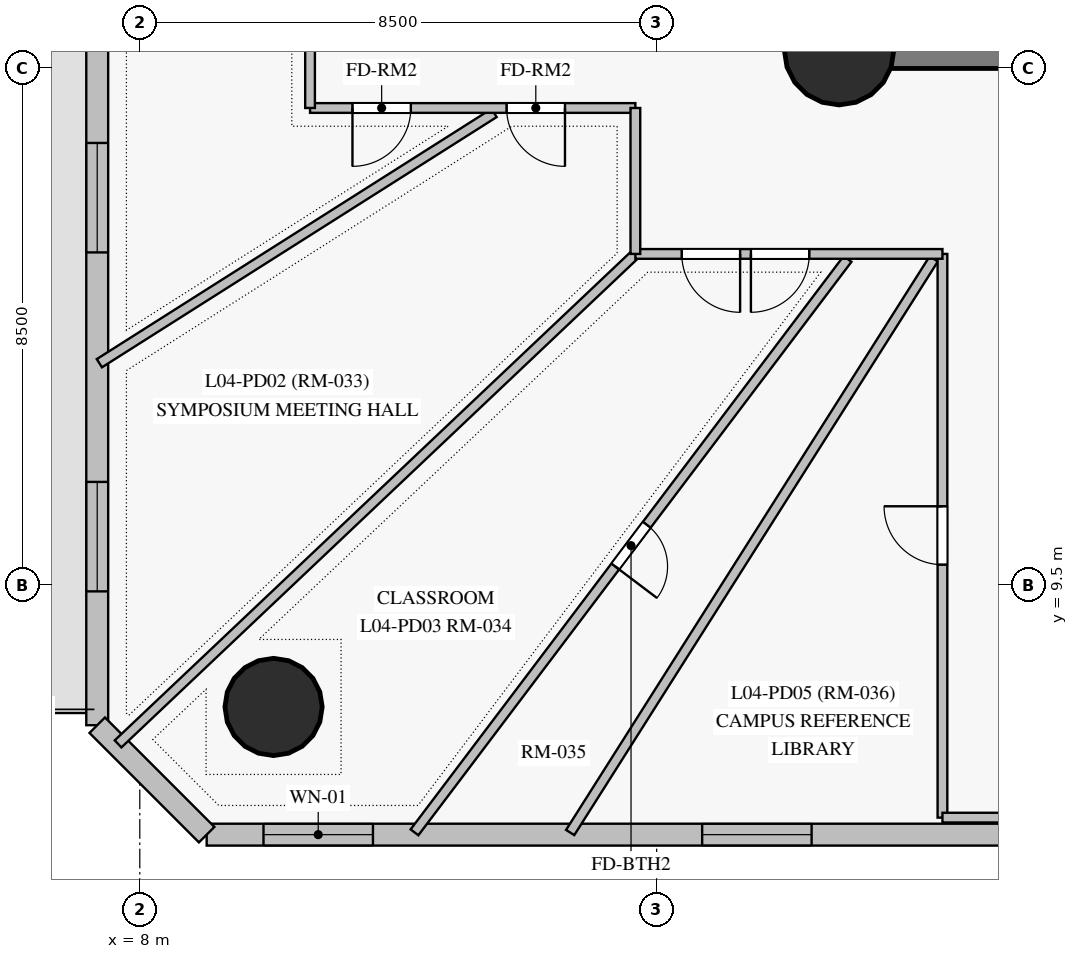
"""IFC4 building model, lengths in metres.
Left out: names, types, materials, properties, quantities, classifications, styles, units other than length and angle.
Written with IfcOpenShell. Run it as: python <this file> out.ifc"""

import sys

from ifc_helpers import new_model, si_unit, direction, frame, frame_2d, origin, origin_with_axes, origin_2d, place, context, subcontext, project, spatial, rectangle, circle, extrude, source, transform, mapped, element, fill, save


model = new_model("IFC4")
c1 = context("Model", 3, precision=1e-05, world=origin(), true_north=direction((0.0, 1.0)))
c2 = subcontext(c1, "Body", "Model", "MODEL_VIEW")
j1 = project(units=[si_unit("LENGTHUNIT", "METRE"), si_unit("PLANEANGLEUNIT", "RADIAN")], contexts=[c1])
p1 = place(None, origin())
s1 = spatial("IfcSite", under=j1, at=p1, CompositionType="ELEMENT")
p2 = place(p1, origin())
s2 = spatial("IfcBuilding", under=s1, at=p2, CompositionType="ELEMENT")
p3 = place(p2, frame((0.0, 0.0, 18.0)))
s3 = spatial("IfcBuildingStorey", under=s2, at=p3, CompositionType="ELEMENT", Elevation=18.0)
p4 = place(p3, frame((19.5, 18.3, 0.0), z_axis=(0.0, 0.0, 1.0), x_axis=(1.0, 0.0, 0.0)))
e1 = element("IfcWall", 1, at=p4, inside=s3, PredefinedType="SHEAR", context=c2, shape_type="SweptSolid", body=[
    extrude(rectangle(XDim=7.05, YDim=0.6, at=frame_2d((3.525, 0.0))), origin(), (0.0, 0.0, 1.0), 4.225),
])
p5 = place(p4, frame((4.2, 0.0, 0.0)))
e2 = element("IfcOpeningElement", 2, at=p5, cuts=e1, PredefinedType="OPENING", context=c2, shape_type="SweptSolid", body=[
    extrude(rectangle(XDim=1.4, YDim=2.2, at=frame_2d((0.7, 1.1))), frame((0.0, 0.31, 0.0), z_axis=(0.0, -1.0, 0.0), x_axis=(1.0, 0.0, 0.0)), (0.0, 0.0, 1.0), 0.62),
])
m1 = source(origin_with_axes(), c2, "Body", "SweptSolid", [
    extrude(circle(Radius=0.9, at=origin_2d()), origin(), (0.0, 0.0, 1.0), 4.5),
])
p6 = place(p3, frame((19.5, 18.3, 0.0), z_axis=(0.0, 0.0, 1.0), x_axis=(1.0, 0.0, 0.0)))
e3 = element("IfcColumn", 3, at=p6, inside=s3, PredefinedType="COLUMN", context=c2, shape_type="MappedRepresentation", body=[
    mapped(m1, transform((0.0, 0.0, 0.0), scale=1.0)),
])
m2 = source(origin_with_axes(), c2, "Body", "SweptSolid", [
    extrude(circle(Radius=0.8, at=origin_2d()), origin(), (0.0, 0.0, 1.0), 4.5),
])
p7 = place(p3, frame((10.2, 7.5, 0.0), z_axis=(0.0, 0.0, 1.0), x_axis=(1.0, 0.0, 0.0)))
e4 = element("IfcColumn", 4, at=p7, inside=s3, PredefinedType="COLUMN", context=c2, shape_type="MappedRepresentation", body=[
    mapped(m2, transform((0.0, 0.0, 0.0), scale=1.0)),
])
p8 = place(p3, frame((9.1, 5.4, 0.0), z_axis=(0.0, 0.0, 1.0), x_axis=(1.0, 0.0, 0.0)))
e5 = element("IfcWall", 5, at=p8, inside=s3, PredefinedType="SOLIDWALL", context=c2, shape_type="SweptSolid", body=[
    extrude(rectangle(XDim=44.3, YDim=0.36, at=frame_2d((22.15, 0.0))), origin(), (0.0, 0.0, 1.0), 4.225),
])
p9 = place(p8, frame((0.934, 0.0, 0.85)))
e6 = element("IfcOpeningElement", 6, at=p9, cuts=e5, PredefinedType="OPENING", context=c2, shape_type="SweptSolid", body=[
    extrude(rectangle(XDim=1.8, YDim=2.2, at=frame_2d((0.9, 1.1))), frame((0.0, 0.19, 0.0), z_axis=(0.0, -1.0, 0.0), x_axis=(1.0, 0.0, 0.0)), (0.0, 0.0, 1.0), 0.38),
])
p10 = place(p8, frame((8.148, 0.0, 0.85)))
e7 = element("IfcOpeningElement", 7, at=p10, cuts=e5, PredefinedType="OPENING", context=c2, shape_type="SweptSolid", body=[
    extrude(rectangle(XDim=1.8, YDim=2.2, at=frame_2d((0.9, 1.1))), frame((0.0, 0.19, 0.0), z_axis=(0.0, -1.0, 0.0), x_axis=(1.0, 0.0, 0.0)), (0.0, 0.0, 1.0), 0.38),
])
p11 = place(p8, frame((13.3, 0.0, 0.85)))
e8 = element("IfcOpeningElement", 8, at=p11, cuts=e5, PredefinedType="OPENING", context=c2, shape_type="SweptSolid", body=[
    extrude(rectangle(XDim=1.8, YDim=2.2, at=frame_2d((0.9, 1.1))), frame((0.0, 0.19, 0.0), z_axis=(0.0, -1.0, 0.0), x_axis=(1.0, 0.0, 0.0)), (0.0, 0.0, 1.0), 0.38),
])
p12 = place(p8, frame((18.486, 0.0, 0.85)))
e9 = element("IfcOpeningElement", 9, at=p12, cuts=e5, PredefinedType="OPENING", context=c2, shape_type="SweptSolid", body=[
    extrude(rectangle(XDim=1.8, YDim=2.2, at=frame_2d((0.9, 1.1))), frame((0.0, 0.19, 0.0), z_axis=(0.0, -1.0, 0.0), x_axis=(1.0, 0.0, 0.0)), (0.0, 0.0, 1.0), 0.38),
])
p13 = place(p8, frame((25.426, 0.0, 0.85)))
e10 = element("IfcOpeningElement", 10, at=p13, cuts=e5, PredefinedType="OPENING", context=c2, shape_type="SweptSolid", body=[
    extrude(rectangle(XDim=1.8, YDim=2.2, at=frame_2d((0.9, 1.1))), frame((0.0, 0.19, 0.0), z_axis=(0.0, -1.0, 0.0), x_axis=(1.0, 0.0, 0.0)), (0.0, 0.0, 1.0), 0.38),
])
p14 = place(p8, frame((31.311, 0.0, 0.85)))
e11 = element("IfcOpeningElement", 11, at=p14, cuts=e5, PredefinedType="OPENING", context=c2, shape_type="SweptSolid", body=[
    extrude(rectangle(XDim=1.8, YDim=2.2, at=frame_2d((0.9, 1.1))), frame((0.0, 0.19, 0.0), z_axis=(0.0, -1.0, 0.0), x_axis=(1.0, 0.0, 0.0)), (0.0, 0.0, 1.0), 0.38),
])
p15 = place(p8, frame((37.481, 0.0, 0.85)))
e12 = element("IfcOpeningElement", 12, at=p15, cuts=e5, PredefinedType="OPENING", context=c2, shape_type="SweptSolid", body=[
    extrude(rectangle(XDim=1.8, YDim=2.2, at=frame_2d((0.9, 1.1))), frame((0.0, 0.19, 0.0), z_axis=(0.0, -1.0, 0.0), x_axis=(1.0, 0.0, 0.0)), (0.0, 0.0, 1.0), 0.38),
])
p16 = place(p8, frame((41.271, 0.0, 0.85)))
e13 = element("IfcOpeningElement", 13, at=p16, cuts=e5, PredefinedType="OPENING", context=c2, shape_type="SweptSolid", body=[
    extrude(rectangle(XDim=1.8, YDim=2.2, at=frame_2d((0.9, 1.1))), frame((0.0, 0.19, 0.0), z_axis=(0.0, -1.0, 0.0), x_axis=(1.0, 0.0, 0.0)), (0.0, 0.0, 1.0), 0.38),
])
p17 = place(p3, frame((7.3, 45.8, 0.0), z_axis=(0.0, 0.0, 1.0), x_axis=(0.0, -1.0, 0.0)))
e14 = element("IfcWall", 14, at=p17, inside=s3, PredefinedType="SOLIDWALL", context=c2, shape_type="SweptSolid", body=[
    extrude(rectangle(XDim=38.6, YDim=0.36, at=frame_2d((19.3, 0.0))), origin(), (0.0, 0.0, 1.0), 4.225),
])
p18 = place(p17, frame((0.817, 0.0, 0.85)))
e15 = element("IfcOpeningElement", 15, at=p18, cuts=e14, PredefinedType="OPENING", context=c2, shape_type="SweptSolid", body=[
    extrude(rectangle(XDim=1.8, YDim=2.2, at=frame_2d((0.9, 1.1))), frame((0.0, 0.19, 0.0), z_axis=(0.0, -1.0, 0.0), x_axis=(1.0, 0.0, 0.0)), (0.0, 0.0, 1.0), 0.38),
])
p19 = place(p17, frame((12.849, 0.0, 0.85)))
e16 = element("IfcOpeningElement", 16, at=p19, cuts=e14, PredefinedType="OPENING", context=c2, shape_type="SweptSolid", body=[
    extrude(rectangle(XDim=1.8, YDim=2.2, at=frame_2d((0.9, 1.1))), frame((0.0, 0.19, 0.0), z_axis=(0.0, -1.0, 0.0), x_axis=(1.0, 0.0, 0.0)), (0.0, 0.0, 1.0), 0.38),
])
p20 = place(p17, frame((18.439, 0.0, 0.85)))
e17 = element("IfcOpeningElement", 17, at=p20, cuts=e14, PredefinedType="OPENING", context=c2, shape_type="SweptSolid", body=[
    extrude(rectangle(XDim=1.8, YDim=2.2, at=frame_2d((0.9, 1.1))), frame((0.0, 0.19, 0.0), z_axis=(0.0, -1.0, 0.0), x_axis=(1.0, 0.0, 0.0)), (0.0, 0.0, 1.0), 0.38),
])
p21 = place(p17, frame((24.258, 0.0, 0.85)))
e18 = element("IfcOpeningElement", 18, at=p21, cuts=e14, PredefinedType="OPENING", context=c2, shape_type="SweptSolid", body=[
    extrude(rectangle(XDim=1.8, YDim=2.2, at=frame_2d((0.9, 1.1))), frame((0.0, 0.19, 0.0), z_axis=(0.0, -1.0, 0.0), x_axis=(1.0, 0.0, 0.0)), (0.0, 0.0, 1.0), 0.38),
])
p22 = place(p17, frame((29.025, 0.0, 0.85)))
e19 = element("IfcOpeningElement", 19, at=p22, cuts=e14, PredefinedType="OPENING", context=c2, shape_type="SweptSolid", body=[
    extrude(rectangle(XDim=1.8, YDim=2.2, at=frame_2d((0.9, 1.1))), frame((0.0, 0.19, 0.0), z_axis=(0.0, -1.0, 0.0), x_axis=(1.0, 0.0, 0.0)), (0.0, 0.0, 1.0), 0.38),
])
p23 = place(p17, frame((34.599, 0.0, 0.85)))
e20 = element("IfcOpeningElement", 20, at=p23, cuts=e14, PredefinedType="OPENING", context=c2, shape_type="SweptSolid", body=[
    extrude(rectangle(XDim=1.8, YDim=2.2, at=frame_2d((0.9, 1.1))), frame((0.0, 0.19, 0.0), z_axis=(0.0, -1.0, 0.0), x_axis=(1.0, 0.0, 0.0)), (0.0, 0.0, 1.0), 0.38),
])
p24 = place(p17, frame((5.908, 0.0, 0.0)))
e21 = element("IfcOpeningElement", 21, at=p24, cuts=e14, PredefinedType="OPENING", context=c2, shape_type="SweptSolid", body=[
    extrude(rectangle(XDim=1.05, YDim=2.12, at=frame_2d((0.525, 1.06))), frame((0.0, 0.19, 0.0), z_axis=(0.0, -1.0, 0.0), x_axis=(1.0, 0.0, 0.0)), (0.0, 0.0, 1.0), 0.38),
])
p25 = place(p3, frame((7.3, 7.2, 0.0), z_axis=(0.0, 0.0, 1.0), x_axis=(0.707106781187, -0.707106781187, 0.0)))
e22 = element("IfcWall", 22, at=p25, inside=s3, PredefinedType="SOLIDWALL", context=c2, shape_type="SweptSolid", body=[
    extrude(rectangle(XDim=2.546, YDim=0.36, at=frame_2d((1.273, 0.0))), origin(), (0.0, 0.0, 1.0), 4.225),
])
p26 = place(p3, frame((19.64, 14.868, 0.0), z_axis=(0.0, 0.0, 1.0), x_axis=(-0.602693961027, -0.797972423923, 0.0)))
e23 = element("IfcWall", 23, at=p26, inside=s3, PredefinedType="PARTITIONING", context=c2, shape_type="SweptSolid", body=[
    extrude(rectangle(XDim=11.817, YDim=0.16, at=frame_2d((5.909, 0.0))), origin(), (0.0, 0.0, 1.0), 2.725),
])
p27 = place(p26, frame((5.479, 0.0, 0.0)))
e24 = element("IfcOpeningElement", 24, at=p27, cuts=e23, PredefinedType="OPENING", context=c2, shape_type="SweptSolid", body=[
    extrude(rectangle(XDim=0.86, YDim=2.04, at=frame_2d((0.43, 1.02))), frame((0.0, 0.09, 0.0), z_axis=(0.0, -1.0, 0.0), x_axis=(1.0, 0.0, 0.0)), (0.0, 0.0, 1.0), 0.18),
])
p28 = place(p3, frame((16.176, 14.971, 0.0), z_axis=(0.0, 0.0, 1.0), x_axis=(-0.726215784898, -0.687466823755, 0.0)))
e25 = element("IfcWall", 25, at=p28, inside=s3, PredefinedType="PARTITIONING", context=c2, shape_type="SweptSolid", body=[
    extrude(rectangle(XDim=11.75, YDim=0.16, at=frame_2d((5.875, 0.0))), origin(), (0.0, 0.0, 1.0), 2.725),
])
p29 = place(p3, frame((21.056, 14.868, 0.0), z_axis=(0.0, 0.0, 1.0), x_axis=(-0.535331338358, -0.844642147996, 0.0)))
e26 = element("IfcWall", 26, at=p29, inside=s3, PredefinedType="PARTITIONING", context=c2, shape_type="SweptSolid", body=[
    extrude(rectangle(XDim=11.168, YDim=0.16, at=frame_2d((5.584, 0.0))), origin(), (0.0, 0.0, 1.0), 4.225),
])
p30 = place(p3, frame((21.2, 5.68, 0.0), z_axis=(0.0, 0.0, 1.0), x_axis=(0.0, 1.0, 0.0)))
e27 = element("IfcWall", 27, at=p30, inside=s3, PredefinedType="PARTITIONING", context=c2, shape_type="SweptSolid", body=[
    extrude(rectangle(XDim=9.27, YDim=0.16, at=frame_2d((4.635, 0.0))), origin(), (0.0, 0.0, 1.0), 4.225),
])
p31 = place(p30, frame((4.16, 0.0, 0.0)))
e28 = element("IfcOpeningElement", 28, at=p31, cuts=e27, PredefinedType="OPENING", context=c2, shape_type="SweptSolid", body=[
    extrude(rectangle(XDim=0.96, YDim=2.15, at=frame_2d((0.48, 1.075))), frame((0.0, 0.09, 0.0), z_axis=(0.0, -1.0, 0.0), x_axis=(1.0, 0.0, 0.0)), (0.0, 0.0, 1.0), 0.18),
])
p32 = place(p3, frame((13.826, 17.268, 0.0), z_axis=(0.0, 0.0, 1.0), x_axis=(-0.844566741784, -0.535450295239, 0.0)))
e29 = element("IfcWall", 29, at=p32, inside=s3, PredefinedType="PARTITIONING", context=c2, shape_type="SweptSolid", body=[
    extrude(rectangle(XDim=7.686, YDim=0.16, at=frame_2d((3.843, 0.0))), origin(), (0.0, 0.0, 1.0), 4.225),
])
p33 = place(p3, frame((16.15, 17.35, 0.0), z_axis=(0.0, 0.0, 1.0), x_axis=(-1.0, 0.0, 0.0)))
e30 = element("IfcWall", 30, at=p33, inside=s3, PredefinedType="PARTITIONING", context=c2, shape_type="SweptSolid", body=[
    extrude(rectangle(XDim=5.35, YDim=0.16, at=frame_2d((2.675, 0.0))), origin(), (0.0, 0.0, 1.0), 4.225),
])
p34 = place(p33, frame((3.692, 0.0, 0.0)))
e31 = element("IfcOpeningElement", 31, at=p34, cuts=e30, PredefinedType="OPENING", context=c2, shape_type="SweptSolid", body=[
    extrude(rectangle(XDim=0.96, YDim=2.15, at=frame_2d((0.48, 1.075))), frame((0.0, 0.09, 0.0), z_axis=(0.0, -1.0, 0.0), x_axis=(1.0, 0.0, 0.0)), (0.0, 0.0, 1.0), 0.18),
])
p35 = place(p33, frame((1.157, 0.0, 0.0)))
e32 = element("IfcOpeningElement", 32, at=p35, cuts=e30, PredefinedType="OPENING", context=c2, shape_type="SweptSolid", body=[
    extrude(rectangle(XDim=0.96, YDim=2.15, at=frame_2d((0.48, 1.075))), frame((0.0, 0.09, 0.0), z_axis=(0.0, -1.0, 0.0), x_axis=(1.0, 0.0, 0.0)), (0.0, 0.0, 1.0), 0.18),
])
p36 = place(p3, frame((21.2, 14.95, 0.0), z_axis=(0.0, 0.0, 1.0), x_axis=(-1.0, 0.0, 0.0)))
e33 = element("IfcWall", 33, at=p36, inside=s3, PredefinedType="PARTITIONING", context=c2, shape_type="SweptSolid", body=[
    extrude(rectangle(XDim=5.05, YDim=0.16, at=frame_2d((2.525, 0.0))), origin(), (0.0, 0.0, 1.0), 4.225),
])
p37 = place(p36, frame((2.19, 0.0, 0.0)))
e34 = element("IfcOpeningElement", 34, at=p37, cuts=e33, PredefinedType="OPENING", context=c2, shape_type="SweptSolid", body=[
    extrude(rectangle(XDim=0.96, YDim=2.15, at=frame_2d((0.48, 1.075))), frame((0.0, 0.09, 0.0), z_axis=(0.0, -1.0, 0.0), x_axis=(1.0, 0.0, 0.0)), (0.0, 0.0, 1.0), 0.18),
])
p38 = place(p36, frame((3.327, 0.0, 0.0)))
e35 = element("IfcOpeningElement", 35, at=p38, cuts=e33, PredefinedType="OPENING", context=c2, shape_type="SweptSolid", body=[
    extrude(rectangle(XDim=0.96, YDim=2.15, at=frame_2d((0.48, 1.075))), frame((0.0, 0.09, 0.0), z_axis=(0.0, -1.0, 0.0), x_axis=(1.0, 0.0, 0.0)), (0.0, 0.0, 1.0), 0.18),
])
p39 = place(p3, frame((25.4, 5.68, 0.0), z_axis=(0.0, 0.0, 1.0), x_axis=(-1.0, 0.0, 0.0)))
e36 = element("IfcWall", 36, at=p39, inside=s3, PredefinedType="PARTITIONING", context=c2, shape_type="SweptSolid", body=[
    extrude(rectangle(XDim=4.2, YDim=0.16, at=frame_2d((2.1, 0.0))), origin(), (0.0, 0.0, 1.0), 4.225),
])
p40 = place(p3, frame((10.8, 17.35, 0.0), z_axis=(0.0, 0.0, 1.0), x_axis=(0.0, 1.0, 0.0)))
e37 = element("IfcWall", 37, at=p40, inside=s3, PredefinedType="PARTITIONING", context=c2, shape_type="SweptSolid", body=[
    extrude(rectangle(XDim=3.07, YDim=0.16, at=frame_2d((1.535, 0.0))), origin(), (0.0, 0.0, 1.0), 4.225),
])
p41 = place(p3, frame((16.15, 14.95, 0.0), z_axis=(0.0, 0.0, 1.0), x_axis=(0.0, 1.0, 0.0)))
e38 = element("IfcWall", 38, at=p41, inside=s3, PredefinedType="PARTITIONING", context=c2, shape_type="SweptSolid", body=[
    extrude(rectangle(XDim=2.4, YDim=0.16, at=frame_2d((1.2, 0.0))), origin(), (0.0, 0.0, 1.0), 2.725),
])
m3 = source(origin_with_axes(), c2, "Body", "SweptSolid", [
    extrude(rectangle(XDim=1.8, YDim=2.2, at=frame_2d((0.9, 1.1))), frame((0.0, 0.03, 0.0), z_axis=(0.0, -1.0, 0.0), x_axis=(1.0, 0.0, 0.0)), (0.0, 0.0, 1.0), 0.06),
])
p42 = place(p9, origin())
e39 = element("IfcWindow", 39, at=p42, inside=s3, PartitioningType="SINGLE_PANEL", PredefinedType="WINDOW", context=c2, shape_type="MappedRepresentation", body=[
    mapped(m3, transform((0.0, 0.0, 0.0), scale=1.0)),
])
fill(e6, e39)
p43 = place(p10, origin())
e40 = element("IfcWindow", 40, at=p43, inside=s3, PartitioningType="SINGLE_PANEL", PredefinedType="WINDOW", context=c2, shape_type="MappedRepresentation", body=[
    mapped(m3, transform((0.0, 0.0, 0.0), scale=1.0)),
])
fill(e7, e40)
p44 = place(p22, origin())
e41 = element("IfcWindow", 41, at=p44, inside=s3, PartitioningType="SINGLE_PANEL", PredefinedType="WINDOW", context=c2, shape_type="MappedRepresentation", body=[
    mapped(m3, transform((0.0, 0.0, 0.0), scale=1.0)),
])
fill(e19, e41)
p45 = place(p23, origin())
e42 = element("IfcWindow", 42, at=p45, inside=s3, PartitioningType="SINGLE_PANEL", PredefinedType="WINDOW", context=c2, shape_type="MappedRepresentation", body=[
    mapped(m3, transform((0.0, 0.0, 0.0), scale=1.0)),
])
fill(e20, e42)
m4 = source(origin_with_axes(), c2, "Body", "SweptSolid", [
    extrude(rectangle(XDim=0.96, YDim=2.15, at=frame_2d((0.48, 1.075))), frame((0.0, 0.025, 0.0), z_axis=(0.0, -1.0, 0.0), x_axis=(1.0, 0.0, 0.0)), (0.0, 0.0, 1.0), 0.05),
])
p46 = place(p34, origin())
e43 = element("IfcDoor", 43, at=p46, inside=s3, OperationType="SINGLE_SWING_RIGHT", PredefinedType="DOOR", context=c2, shape_type="MappedRepresentation", body=[
    mapped(m4, transform((0.0, 0.0, 0.0), scale=1.0)),
])
fill(e31, e43)
p47 = place(p35, origin())
e44 = element("IfcDoor", 44, at=p47, inside=s3, OperationType="SINGLE_SWING_LEFT", PredefinedType="DOOR", context=c2, shape_type="MappedRepresentation", body=[
    mapped(m4, transform((0.0, 0.0, 0.0), scale=1.0)),
])
fill(e32, e44)
p48 = place(p37, origin())
e45 = element("IfcDoor", 45, at=p48, inside=s3, OperationType="SINGLE_SWING_RIGHT", PredefinedType="DOOR", context=c2, shape_type="MappedRepresentation", body=[
    mapped(m4, transform((0.0, 0.0, 0.0), scale=1.0)),
])
fill(e34, e45)
p49 = place(p38, origin())
e46 = element("IfcDoor", 46, at=p49, inside=s3, OperationType="SINGLE_SWING_LEFT", PredefinedType="DOOR", context=c2, shape_type="MappedRepresentation", body=[
    mapped(m4, transform((0.0, 0.0, 0.0), scale=1.0)),
])
fill(e35, e46)
p50 = place(p31, origin())
e47 = element("IfcDoor", 47, at=p50, inside=s3, OperationType="SINGLE_SWING_RIGHT", PredefinedType="DOOR", context=c2, shape_type="MappedRepresentation", body=[
    mapped(m4, transform((0.0, 0.0, 0.0), scale=1.0)),
])
fill(e28, e47)
m5 = source(origin_with_axes(), c2, "Body", "SweptSolid", [
    extrude(rectangle(XDim=0.86, YDim=2.04, at=frame_2d((0.43, 1.02))), frame((0.0, 0.025, 0.0), z_axis=(0.0, -1.0, 0.0), x_axis=(1.0, 0.0, 0.0)), (0.0, 0.0, 1.0), 0.05),
])
p51 = place(p27, origin())
e48 = element("IfcDoor", 48, at=p51, inside=s3, OperationType="SINGLE_SWING_RIGHT", PredefinedType="DOOR", context=c2, shape_type="MappedRepresentation", body=[
    mapped(m5, transform((0.0, 0.0, 0.0), scale=1.0)),
])
fill(e24, e48)
save(model, sys.argv[1])
